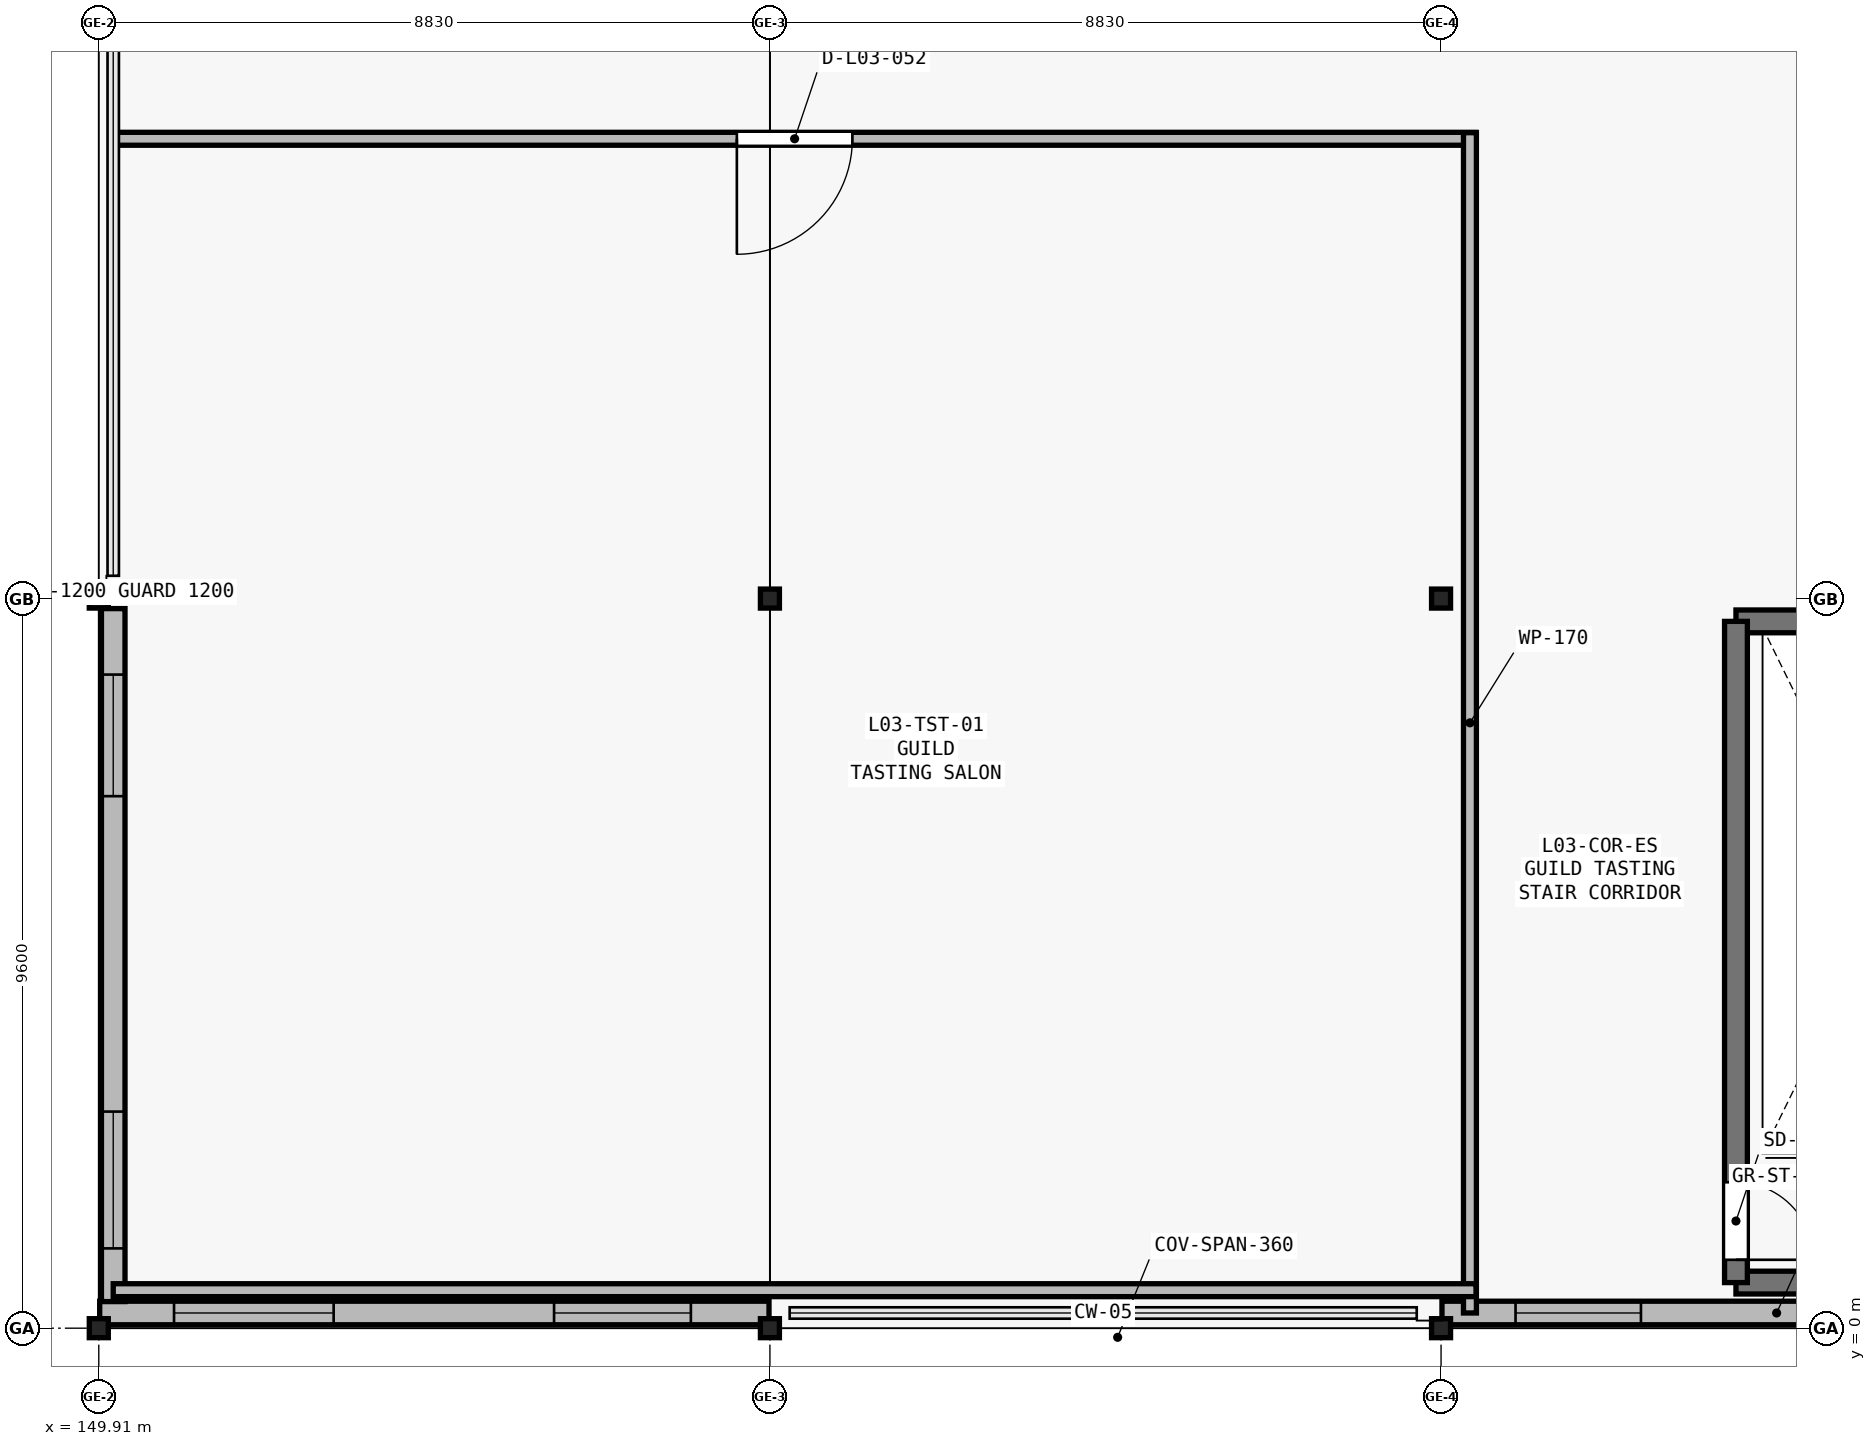
"""IFC4 building model, lengths in metres.
Left out: names, types, materials, properties, quantities, classifications, styles, units other than length and angle.
Written with IfcOpenShell. Run it as: python <this file> out.ifc"""

import sys

from ifc_helpers import new_model, si_unit, direction, frame, frame_2d, origin, origin_2d, place, context, subcontext, project, spatial, rectangle, i_section, extrude, element, fill, save


model = new_model("IFC4")
c1 = context("Model", 3, precision=1e-05, world=origin(), true_north=direction((0.0, 1.0)))
c2 = subcontext(c1, "Body", "Model", "MODEL_VIEW")
j1 = project(units=[si_unit("LENGTHUNIT", "METRE"), si_unit("PLANEANGLEUNIT", "RADIAN")], contexts=[c1])
p1 = place(None, origin())
s1 = spatial("IfcSite", under=j1, at=p1, CompositionType="ELEMENT")
p2 = place(p1, origin())
s2 = spatial("IfcBuilding", under=s1, at=p2, CompositionType="ELEMENT")
p3 = place(p2, frame((0.0, 0.0, 15.0)))
s3 = spatial("IfcBuildingStorey", under=s2, at=p3, CompositionType="ELEMENT", Elevation=15.0)
for number, where, z_axis, x_axis in (
    (1, (149.91, 0.0, 0.0), (0.0, 0.0, 1.0), (1.0, 0.0, 0.0)),
    (2, (149.91, 9.6, 0.0), (0.0, 0.0, 1.0), (1.0, 0.0, 0.0)),
    (3, (158.74, 0.0, 0.0), (0.0, 0.0, 1.0), (1.0, 0.0, 0.0)),
    (4, (158.74, 9.6, 0.0), (0.0, 0.0, 1.0), (1.0, 0.0, 0.0)),
    (5, (167.57, 0.0, 0.0), (0.0, 0.0, 1.0), (1.0, 0.0, 0.0)),
    (6, (167.57, 9.6, 0.0), (0.0, 0.0, 1.0), (1.0, 0.0, 0.0)),
):
    element("IfcColumn", number, at=place(p3, frame(where, z_axis=z_axis, x_axis=x_axis)), inside=s3, PredefinedType="COLUMN", context=c2, shape_type="SweptSolid", body=[
        extrude(i_section(OverallWidth=0.25, OverallDepth=0.25, WebThickness=0.009, FlangeThickness=0.014, FilletRadius=0.016, at=origin_2d()), origin(), (0.0, 0.0, 1.0), 4.2),
    ])
p4 = place(p3, frame((176.388, 0.2, 0.0), z_axis=(0.0, 0.0, 1.0), x_axis=(-1.0, 0.0, 0.0)))
e7 = element("IfcWall", 7, at=p4, inside=s3, PredefinedType="SOLIDWALL", context=c2, shape_type="SweptSolid", body=[
    extrude(rectangle(XDim=8.806, YDim=0.31, at=frame_2d((4.403, 0.0))), origin(), (0.0, 0.0, 1.0), 3.35),
])
p5 = place(p4, frame((1.038, 0.0, 0.95)))
e8 = element("IfcOpeningElement", 8, at=p5, cuts=e7, PredefinedType="OPENING", context=c2, shape_type="SweptSolid", body=[
    extrude(rectangle(XDim=1.5, YDim=1.8, at=frame_2d((0.75, 0.9))), frame((0.0, 0.165, 0.0), z_axis=(0.0, -1.0, 0.0), x_axis=(1.0, 0.0, 0.0)), (0.0, 0.0, 1.0), 0.33),
])
p6 = place(p4, frame((6.188, 0.0, 0.95)))
e9 = element("IfcOpeningElement", 9, at=p6, cuts=e7, PredefinedType="OPENING", context=c2, shape_type="SweptSolid", body=[
    extrude(rectangle(XDim=1.65, YDim=1.8, at=frame_2d((0.825, 0.9))), frame((0.0, 0.165, 0.0), z_axis=(0.0, -1.0, 0.0), x_axis=(1.0, 0.0, 0.0)), (0.0, 0.0, 1.0), 0.33),
])
p7 = place(p3, frame((158.728, 0.2, 0.0), z_axis=(0.0, 0.0, 1.0), x_axis=(-1.0, 0.0, 0.0)))
e10 = element("IfcWall", 10, at=p7, inside=s3, PredefinedType="SOLIDWALL", context=c2, shape_type="SweptSolid", body=[
    extrude(rectangle(XDim=8.806, YDim=0.31, at=frame_2d((4.403, 0.0))), origin(), (0.0, 0.0, 1.0), 3.35),
])
p8 = place(p7, frame((1.028, 0.0, 0.95)))
e11 = element("IfcOpeningElement", 11, at=p8, cuts=e10, PredefinedType="OPENING", context=c2, shape_type="SweptSolid", body=[
    extrude(rectangle(XDim=1.8, YDim=1.8, at=frame_2d((0.9, 0.9))), frame((0.0, 0.165, 0.0), z_axis=(0.0, -1.0, 0.0), x_axis=(1.0, 0.0, 0.0)), (0.0, 0.0, 1.0), 0.33),
])
p9 = place(p7, frame((5.728, 0.0, 0.95)))
e12 = element("IfcOpeningElement", 12, at=p9, cuts=e10, PredefinedType="OPENING", context=c2, shape_type="SweptSolid", body=[
    extrude(rectangle(XDim=2.1, YDim=1.8, at=frame_2d((1.05, 0.9))), frame((0.0, 0.165, 0.0), z_axis=(0.0, -1.0, 0.0), x_axis=(1.0, 0.0, 0.0)), (0.0, 0.0, 1.0), 0.33),
])
p10 = place(p3, frame((150.1, 9.468, 0.0), z_axis=(0.0, 0.0, 1.0), x_axis=(0.0, -1.0, 0.0)))
e13 = element("IfcWall", 13, at=p10, inside=s3, PredefinedType="SOLIDWALL", context=c2, shape_type="SweptSolid", body=[
    extrude(rectangle(XDim=9.118, YDim=0.31, at=frame_2d((4.559, 0.0))), origin(), (0.0, 0.0, 1.0), 3.35),
])
p11 = place(p10, frame((0.868, 0.0, 0.95)))
e14 = element("IfcOpeningElement", 14, at=p11, cuts=e13, PredefinedType="OPENING", context=c2, shape_type="SweptSolid", body=[
    extrude(rectangle(XDim=1.6, YDim=2.1, at=frame_2d((0.8, 1.05))), frame((0.0, 0.165, 0.0), z_axis=(0.0, -1.0, 0.0), x_axis=(1.0, 0.0, 0.0)), (0.0, 0.0, 1.0), 0.33),
])
p12 = place(p10, frame((6.618, 0.0, 0.95)))
e15 = element("IfcOpeningElement", 15, at=p12, cuts=e13, PredefinedType="OPENING", context=c2, shape_type="SweptSolid", body=[
    extrude(rectangle(XDim=1.8, YDim=2.1, at=frame_2d((0.9, 1.05))), frame((0.0, 0.165, 0.0), z_axis=(0.0, -1.0, 0.0), x_axis=(1.0, 0.0, 0.0)), (0.0, 0.0, 1.0), 0.33),
])
for number, where, z_axis, x_axis in (
    (16, (171.45, 0.6, 0.0), (0.0, 0.0, 1.0), (1.0, 0.0, 0.0)),
    (17, (175.55, 9.3, 0.0), (0.0, 0.0, 1.0), (-1.0, 0.0, 0.0)),
):
    element("IfcWall", number, at=place(p3, frame(where, z_axis=z_axis, x_axis=x_axis)), inside=s3, PredefinedType="SHEAR", context=c2, shape_type="SweptSolid", body=[
        extrude(rectangle(XDim=4.1, YDim=0.3, at=frame_2d((2.05, 0.0))), origin(), (0.0, 0.0, 1.0), 4.2),
    ])
p13 = place(p3, frame((171.45, 9.3, 0.0), z_axis=(0.0, 0.0, 1.0), x_axis=(0.0, -1.0, 0.0)))
e18 = element("IfcWall", 18, at=p13, inside=s3, PredefinedType="SHEAR", context=c2, shape_type="SweptSolid", body=[
    extrude(rectangle(XDim=8.7, YDim=0.3, at=frame_2d((4.35, 0.0))), origin(), (0.0, 0.0, 1.0), 4.2),
])
p14 = place(p13, frame((7.38, 0.0, 0.0)))
e19 = element("IfcOpeningElement", 19, at=p14, cuts=e18, PredefinedType="OPENING", context=c2, shape_type="SweptSolid", body=[
    extrude(rectangle(XDim=1.02, YDim=2.1, at=frame_2d((0.51, 1.05))), frame((0.0, 0.16, 0.0), z_axis=(0.0, -1.0, 0.0), x_axis=(1.0, 0.0, 0.0)), (0.0, 0.0, 1.0), 0.32),
])
p15 = place(p3, frame((168.03, 15.65, 0.0), z_axis=(0.0, 0.0, 1.0), x_axis=(-1.0, 0.0, 0.0)))
e20 = element("IfcWall", 20, at=p15, inside=s3, PredefinedType="PARTITIONING", context=c2, shape_type="SweptSolid", body=[
    extrude(rectangle(XDim=17.93, YDim=0.17, at=frame_2d((8.965, 0.0))), origin(), (0.0, 0.0, 1.0), 3.72),
])
p16 = place(p15, frame((8.205, 0.0, 0.0)))
e21 = element("IfcOpeningElement", 21, at=p16, cuts=e20, PredefinedType="OPENING", context=c2, shape_type="SweptSolid", body=[
    extrude(rectangle(XDim=1.52, YDim=2.28, at=frame_2d((0.76, 1.14))), frame((0.0, 0.095, 0.0), z_axis=(0.0, -1.0, 0.0), x_axis=(1.0, 0.0, 0.0)), (0.0, 0.0, 1.0), 0.19),
])
p17 = place(p3, frame((167.95, 0.2, 0.0), z_axis=(0.0, 0.0, 1.0), x_axis=(0.0, 1.0, 0.0)))
e22 = element("IfcWall", 22, at=p17, inside=s3, PredefinedType="PARTITIONING", context=c2, shape_type="SweptSolid", body=[
    extrude(rectangle(XDim=15.53, YDim=0.17, at=frame_2d((7.765, 0.0))), origin(), (0.0, 0.0, 1.0), 3.72),
])
p18 = place(p3, frame((150.1, 0.5, 0.0), z_axis=(0.0, 0.0, 1.0), x_axis=(1.0, 0.0, 0.0)))
e23 = element("IfcWall", 23, at=p18, inside=s3, PredefinedType="PARTITIONING", context=c2, shape_type="SweptSolid", body=[
    extrude(rectangle(XDim=17.93, YDim=0.17, at=frame_2d((8.965, 0.0))), origin(), (0.0, 0.0, 1.0), 3.72),
])
p19 = place(p6, origin())
e24 = element("IfcWindow", 24, at=p19, inside=s3, PartitioningType="SINGLE_PANEL", PredefinedType="WINDOW", context=c2, shape_type="SweptSolid", body=[
    extrude(rectangle(XDim=1.65, YDim=1.8, at=frame_2d((0.825, 0.9))), frame((0.0, 0.03, 0.0), z_axis=(0.0, -1.0, 0.0), x_axis=(1.0, 0.0, 0.0)), (0.0, 0.0, 1.0), 0.06),
])
fill(e9, e24)
p20 = place(p8, origin())
e25 = element("IfcWindow", 25, at=p20, inside=s3, PartitioningType="SINGLE_PANEL", PredefinedType="WINDOW", context=c2, shape_type="SweptSolid", body=[
    extrude(rectangle(XDim=1.8, YDim=1.8, at=frame_2d((0.9, 0.9))), frame((0.0, 0.03, 0.0), z_axis=(0.0, -1.0, 0.0), x_axis=(1.0, 0.0, 0.0)), (0.0, 0.0, 1.0), 0.06),
])
fill(e11, e25)
p21 = place(p9, origin())
e26 = element("IfcWindow", 26, at=p21, inside=s3, PartitioningType="SINGLE_PANEL", PredefinedType="WINDOW", context=c2, shape_type="SweptSolid", body=[
    extrude(rectangle(XDim=2.1, YDim=1.8, at=frame_2d((1.05, 0.9))), frame((0.0, 0.03, 0.0), z_axis=(0.0, -1.0, 0.0), x_axis=(1.0, 0.0, 0.0)), (0.0, 0.0, 1.0), 0.06),
])
fill(e12, e26)
p22 = place(p11, origin())
e27 = element("IfcWindow", 27, at=p22, inside=s3, PartitioningType="SINGLE_PANEL", PredefinedType="WINDOW", context=c2, shape_type="SweptSolid", body=[
    extrude(rectangle(XDim=1.6, YDim=2.1, at=frame_2d((0.8, 1.05))), frame((0.0, 0.03, 0.0), z_axis=(0.0, -1.0, 0.0), x_axis=(1.0, 0.0, 0.0)), (0.0, 0.0, 1.0), 0.06),
])
fill(e14, e27)
p23 = place(p12, origin())
e28 = element("IfcWindow", 28, at=p23, inside=s3, PartitioningType="SINGLE_PANEL", PredefinedType="WINDOW", context=c2, shape_type="SweptSolid", body=[
    extrude(rectangle(XDim=1.8, YDim=2.1, at=frame_2d((0.9, 1.05))), frame((0.0, 0.03, 0.0), z_axis=(0.0, -1.0, 0.0), x_axis=(1.0, 0.0, 0.0)), (0.0, 0.0, 1.0), 0.06),
])
fill(e15, e28)
p24 = place(p14, origin())
e29 = element("IfcDoor", 29, at=p24, inside=s3, OperationType="SINGLE_SWING_RIGHT", PredefinedType="DOOR", context=c2, shape_type="SweptSolid", body=[
    extrude(rectangle(XDim=1.02, YDim=2.1, at=frame_2d((0.51, 1.05))), frame((0.0, 0.025, 0.0), z_axis=(0.0, -1.0, 0.0), x_axis=(1.0, 0.0, 0.0)), (0.0, 0.0, 1.0), 0.05),
])
fill(e19, e29)
p25 = place(p16, origin())
e30 = element("IfcDoor", 30, at=p25, inside=s3, OperationType="SINGLE_SWING_RIGHT", PredefinedType="DOOR", context=c2, shape_type="SweptSolid", body=[
    extrude(rectangle(XDim=1.52, YDim=2.28, at=frame_2d((0.76, 1.14))), frame((0.0, 0.025, 0.0), z_axis=(0.0, -1.0, 0.0), x_axis=(1.0, 0.0, 0.0)), (0.0, 0.0, 1.0), 0.05),
])
fill(e21, e30)
save(model, sys.argv[1])
